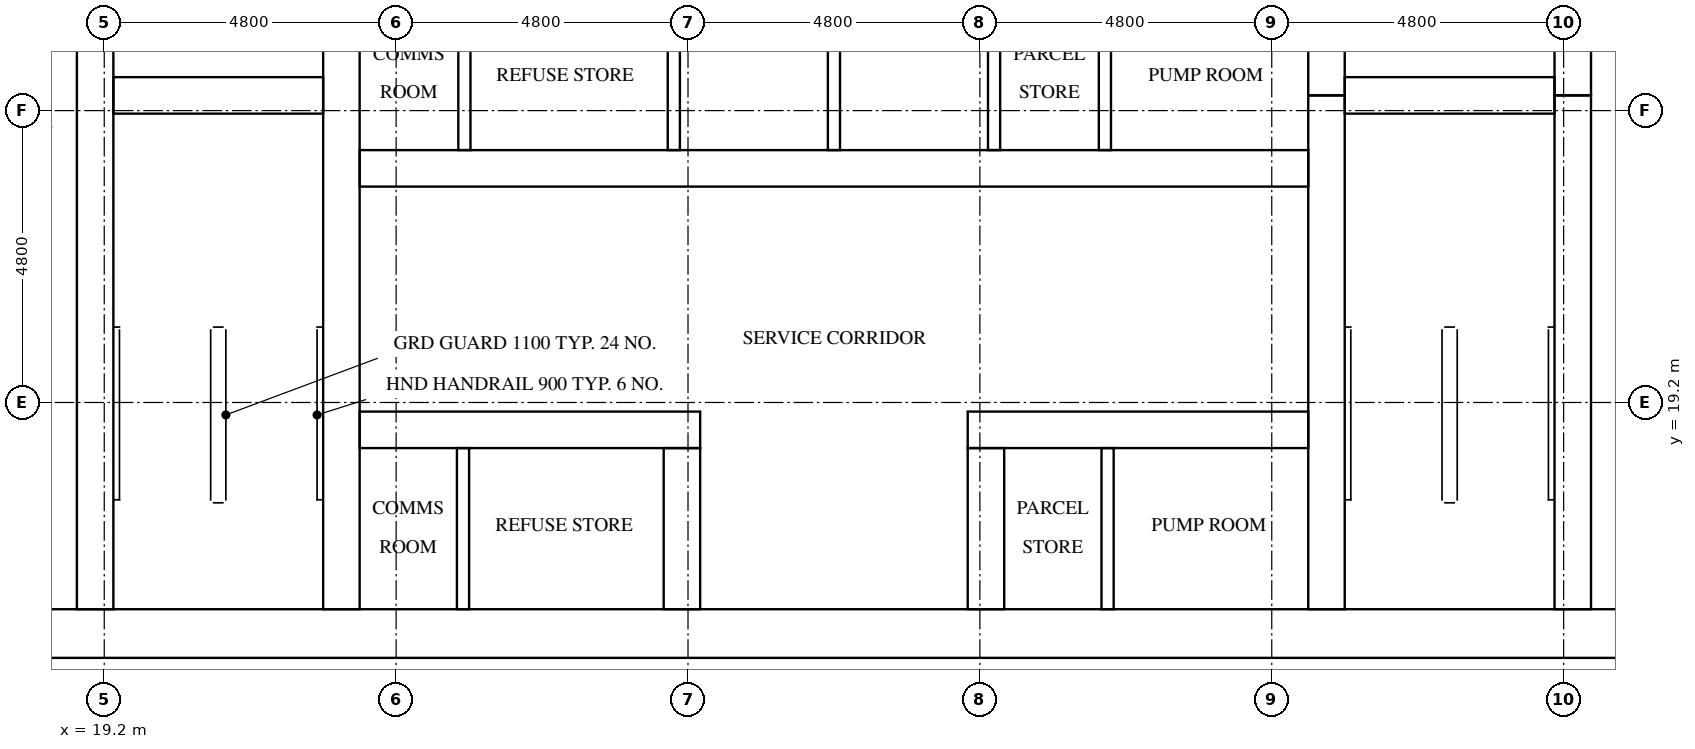
"""IFC4 building model, lengths in metres.
Left out: names, types, materials, properties, quantities, classifications, styles, units other than length and angle.
Written with IfcOpenShell. Run it as: python <this file> out.ifc"""

import sys

from ifc_helpers import new_model, si_unit, direction, frame, frame_2d, origin, place, context, subcontext, project, spatial, rectangle, extrude, element, fill, save


model = new_model("IFC4")
c1 = context("Model", 3, precision=1e-05, world=origin(), true_north=direction((0.0, 1.0)))
c2 = subcontext(c1, "Body", "Model", "MODEL_VIEW")
j1 = project(units=[si_unit("LENGTHUNIT", "METRE"), si_unit("PLANEANGLEUNIT", "RADIAN")], contexts=[c1])
p1 = place(None, origin())
s1 = spatial("IfcSite", under=j1, at=p1, CompositionType="ELEMENT")
p2 = place(p1, origin())
s2 = spatial("IfcBuilding", under=s1, at=p2, CompositionType="ELEMENT")
p3 = place(p2, frame((0.0, 0.0, 156.0)))
s3 = spatial("IfcBuildingStorey", under=s2, at=p3, CompositionType="ELEMENT", Elevation=156.0)
p4 = place(p3, frame((15.0, 15.4, 0.0), z_axis=(0.0, 0.0, 1.0), x_axis=(1.0, 0.0, 0.0)))
e1 = element("IfcWall", 1, at=p4, inside=s3, PredefinedType="SHEAR", context=c2, shape_type="SweptSolid", body=[
    extrude(rectangle(XDim=32.4, YDim=0.8, at=frame_2d((16.2, 0.0))), origin(), (0.0, 0.0, 1.0), 3.2),
])
p5 = place(p4, frame((15.3, 0.0, 0.0)))
e2 = element("IfcOpeningElement", 2, at=p5, cuts=e1, PredefinedType="OPENING", context=c2, shape_type="SweptSolid", body=[
    extrude(rectangle(XDim=1.8, YDim=2.1, at=frame_2d((0.9, 1.05))), frame((0.0, 0.41, 0.0), z_axis=(0.0, -1.0, 0.0), x_axis=(1.0, 0.0, 0.0)), (0.0, 0.0, 1.0), 0.82),
])
p6 = place(p3, frame((19.05, 15.8, 0.0), z_axis=(0.0, 0.0, 1.0), x_axis=(0.0, 1.0, 0.0)))
e3 = element("IfcWall", 3, at=p6, inside=s3, PredefinedType="SHEAR", context=c2, shape_type="SweptSolid", body=[
    extrude(rectangle(XDim=15.15, YDim=0.6, at=frame_2d((7.575, 0.0))), origin(), (0.0, 0.0, 1.0), 3.2),
])
p7 = place(p6, frame((9.65, 0.0, 0.0)))
e4 = element("IfcOpeningElement", 4, at=p7, cuts=e3, PredefinedType="OPENING", context=c2, shape_type="SweptSolid", body=[
    extrude(rectangle(XDim=1.1, YDim=2.1, at=frame_2d((0.55, 1.05))), frame((0.0, 0.31, 0.0), z_axis=(0.0, -1.0, 0.0), x_axis=(1.0, 0.0, 0.0)), (0.0, 0.0, 1.0), 0.62),
])
p8 = place(p6, frame((13.15, 0.0, 0.0)))
e5 = element("IfcOpeningElement", 5, at=p8, cuts=e3, PredefinedType="OPENING", context=c2, shape_type="SweptSolid", body=[
    extrude(rectangle(XDim=1.1, YDim=2.1, at=frame_2d((0.55, 1.05))), frame((0.0, 0.31, 0.0), z_axis=(0.0, -1.0, 0.0), x_axis=(1.0, 0.0, 0.0)), (0.0, 0.0, 1.0), 0.62),
])
p9 = place(p6, frame((0.4, 0.0, 0.0)))
e6 = element("IfcOpeningElement", 6, at=p9, cuts=e3, PredefinedType="OPENING", context=c2, shape_type="SweptSolid", body=[
    extrude(rectangle(XDim=1.2, YDim=2.1, at=frame_2d((0.6, 1.05))), frame((0.0, 0.31, 0.0), z_axis=(0.0, -1.0, 0.0), x_axis=(1.0, 0.0, 0.0)), (0.0, 0.0, 1.0), 0.62),
])
p10 = place(p3, frame((23.1, 15.8, 0.0), z_axis=(0.0, 0.0, 1.0), x_axis=(0.0, 1.0, 0.0)))
e7 = element("IfcWall", 7, at=p10, inside=s3, PredefinedType="SHEAR", context=c2, shape_type="SweptSolid", body=[
    extrude(rectangle(XDim=21.2, YDim=0.6, at=frame_2d((10.6, 0.0))), origin(), (0.0, 0.0, 1.0), 3.2),
])
p11 = place(p3, frame((39.3, 15.8, 0.0), z_axis=(0.0, 0.0, 1.0), x_axis=(0.0, 1.0, 0.0)))
e8 = element("IfcWall", 8, at=p11, inside=s3, PredefinedType="SHEAR", context=c2, shape_type="SweptSolid", body=[
    extrude(rectangle(XDim=8.45, YDim=0.6, at=frame_2d((4.225, 0.0))), origin(), (0.0, 0.0, 1.0), 3.2),
])
p12 = place(p3, frame((39.3, 24.25, 0.0), z_axis=(0.0, 0.0, 1.0), x_axis=(0.0, 1.0, 0.0)))
e9 = element("IfcWall", 9, at=p12, inside=s3, PredefinedType="SHEAR", context=c2, shape_type="SweptSolid", body=[
    extrude(rectangle(XDim=3.5, YDim=0.6, at=frame_2d((1.75, 0.0))), origin(), (0.0, 0.0, 1.0), 3.2),
])
p13 = place(p3, frame((43.35, 15.8, 0.0), z_axis=(0.0, 0.0, 1.0), x_axis=(0.0, 1.0, 0.0)))
e10 = element("IfcWall", 10, at=p13, inside=s3, PredefinedType="SHEAR", context=c2, shape_type="SweptSolid", body=[
    extrude(rectangle(XDim=8.45, YDim=0.6, at=frame_2d((4.225, 0.0))), origin(), (0.0, 0.0, 1.0), 3.2),
])
p14 = place(p13, frame((0.4, 0.0, 0.0)))
e11 = element("IfcOpeningElement", 11, at=p14, cuts=e10, PredefinedType="OPENING", context=c2, shape_type="SweptSolid", body=[
    extrude(rectangle(XDim=1.2, YDim=2.1, at=frame_2d((0.6, 1.05))), frame((0.0, 0.31, 0.0), z_axis=(0.0, -1.0, 0.0), x_axis=(1.0, 0.0, 0.0)), (0.0, 0.0, 1.0), 0.62),
])
p15 = place(p3, frame((43.35, 24.25, 0.0), z_axis=(0.0, 0.0, 1.0), x_axis=(0.0, 1.0, 0.0)))
e12 = element("IfcWall", 12, at=p15, inside=s3, PredefinedType="SHEAR", context=c2, shape_type="SweptSolid", body=[
    extrude(rectangle(XDim=3.5, YDim=0.6, at=frame_2d((1.75, 0.0))), origin(), (0.0, 0.0, 1.0), 3.2),
])
p16 = place(p15, frame((1.2, 0.0, 0.0)))
e13 = element("IfcOpeningElement", 13, at=p16, cuts=e12, PredefinedType="OPENING", context=c2, shape_type="SweptSolid", body=[
    extrude(rectangle(XDim=1.1, YDim=2.1, at=frame_2d((0.55, 1.05))), frame((0.0, 0.31, 0.0), z_axis=(0.0, -1.0, 0.0), x_axis=(1.0, 0.0, 0.0)), (0.0, 0.0, 1.0), 0.62),
])
for number, where, z_axis, x_axis in (
    (14, (19.35, 24.25, 0.0), (0.0, 0.0, 1.0), (1.0, 0.0, 0.0)),
    (15, (39.6, 24.25, 0.0), (0.0, 0.0, 1.0), (1.0, 0.0, 0.0)),
):
    element("IfcWall", number, at=place(p3, frame(where, z_axis=z_axis, x_axis=x_axis)), inside=s3, PredefinedType="SHEAR", context=c2, shape_type="SweptSolid", body=[
        extrude(rectangle(XDim=3.45, YDim=0.6, at=frame_2d((1.725, 0.0))), origin(), (0.0, 0.0, 1.0), 3.2),
    ])
p17 = place(p3, frame((23.4, 18.75, 0.0), z_axis=(0.0, 0.0, 1.0), x_axis=(1.0, 0.0, 0.0)))
e16 = element("IfcWall", 16, at=p17, inside=s3, PredefinedType="SHEAR", context=c2, shape_type="SweptSolid", body=[
    extrude(rectangle(XDim=5.6, YDim=0.6, at=frame_2d((2.8, 0.0))), origin(), (0.0, 0.0, 1.0), 3.2),
])
p18 = place(p17, frame((0.3, 0.0, 0.0)))
e17 = element("IfcOpeningElement", 17, at=p18, cuts=e16, PredefinedType="OPENING", context=c2, shape_type="SweptSolid", body=[
    extrude(rectangle(XDim=1.0, YDim=2.1, at=frame_2d((0.5, 1.05))), frame((0.0, 0.31, 0.0), z_axis=(0.0, -1.0, 0.0), x_axis=(1.0, 0.0, 0.0)), (0.0, 0.0, 1.0), 0.62),
])
p19 = place(p17, frame((2.9, 0.0, 0.0)))
e18 = element("IfcOpeningElement", 18, at=p19, cuts=e16, PredefinedType="OPENING", context=c2, shape_type="SweptSolid", body=[
    extrude(rectangle(XDim=1.0, YDim=2.1, at=frame_2d((0.5, 1.05))), frame((0.0, 0.31, 0.0), z_axis=(0.0, -1.0, 0.0), x_axis=(1.0, 0.0, 0.0)), (0.0, 0.0, 1.0), 0.62),
])
p20 = place(p3, frame((33.4, 18.75, 0.0), z_axis=(0.0, 0.0, 1.0), x_axis=(1.0, 0.0, 0.0)))
e19 = element("IfcWall", 19, at=p20, inside=s3, PredefinedType="SHEAR", context=c2, shape_type="SweptSolid", body=[
    extrude(rectangle(XDim=5.6, YDim=0.6, at=frame_2d((2.8, 0.0))), origin(), (0.0, 0.0, 1.0), 3.2),
])
p21 = place(p20, frame((0.9, 0.0, 0.0)))
e20 = element("IfcOpeningElement", 20, at=p21, cuts=e19, PredefinedType="OPENING", context=c2, shape_type="SweptSolid", body=[
    extrude(rectangle(XDim=1.0, YDim=2.1, at=frame_2d((0.5, 1.05))), frame((0.0, 0.31, 0.0), z_axis=(0.0, -1.0, 0.0), x_axis=(1.0, 0.0, 0.0)), (0.0, 0.0, 1.0), 0.62),
])
p22 = place(p20, frame((3.5, 0.0, 0.0)))
e21 = element("IfcOpeningElement", 21, at=p22, cuts=e19, PredefinedType="OPENING", context=c2, shape_type="SweptSolid", body=[
    extrude(rectangle(XDim=1.0, YDim=2.1, at=frame_2d((0.5, 1.05))), frame((0.0, 0.31, 0.0), z_axis=(0.0, -1.0, 0.0), x_axis=(1.0, 0.0, 0.0)), (0.0, 0.0, 1.0), 0.62),
])
p23 = place(p3, frame((23.4, 23.05, 0.0), z_axis=(0.0, 0.0, 1.0), x_axis=(1.0, 0.0, 0.0)))
e22 = element("IfcWall", 22, at=p23, inside=s3, PredefinedType="SHEAR", context=c2, shape_type="SweptSolid", body=[
    extrude(rectangle(XDim=15.6, YDim=0.6, at=frame_2d((7.8, 0.0))), origin(), (0.0, 0.0, 1.0), 3.2),
])
p24 = place(p23, frame((0.311, 0.0, 0.0)))
e23 = element("IfcOpeningElement", 23, at=p24, cuts=e22, PredefinedType="OPENING", context=c2, shape_type="SweptSolid", body=[
    extrude(rectangle(XDim=1.0, YDim=2.1, at=frame_2d((0.5, 1.05))), frame((0.0, 0.31, 0.0), z_axis=(0.0, -1.0, 0.0), x_axis=(1.0, 0.0, 0.0)), (0.0, 0.0, 1.0), 0.62),
])
p25 = place(p23, frame((2.945, 0.0, 0.0)))
e24 = element("IfcOpeningElement", 24, at=p25, cuts=e22, PredefinedType="OPENING", context=c2, shape_type="SweptSolid", body=[
    extrude(rectangle(XDim=1.0, YDim=2.1, at=frame_2d((0.5, 1.05))), frame((0.0, 0.31, 0.0), z_axis=(0.0, -1.0, 0.0), x_axis=(1.0, 0.0, 0.0)), (0.0, 0.0, 1.0), 0.62),
])
p26 = place(p23, frame((10.845, 0.0, 0.0)))
e25 = element("IfcOpeningElement", 25, at=p26, cuts=e22, PredefinedType="OPENING", context=c2, shape_type="SweptSolid", body=[
    extrude(rectangle(XDim=1.0, YDim=2.1, at=frame_2d((0.5, 1.05))), frame((0.0, 0.31, 0.0), z_axis=(0.0, -1.0, 0.0), x_axis=(1.0, 0.0, 0.0)), (0.0, 0.0, 1.0), 0.62),
])
p27 = place(p23, frame((13.478, 0.0, 0.0)))
e26 = element("IfcOpeningElement", 26, at=p27, cuts=e22, PredefinedType="OPENING", context=c2, shape_type="SweptSolid", body=[
    extrude(rectangle(XDim=1.0, YDim=2.1, at=frame_2d((0.5, 1.05))), frame((0.0, 0.31, 0.0), z_axis=(0.0, -1.0, 0.0), x_axis=(1.0, 0.0, 0.0)), (0.0, 0.0, 1.0), 0.62),
])
for number, where, z_axis, x_axis in (
    (27, (28.7, 15.8, 0.0), (0.0, 0.0, 1.0), (0.0, 1.0, 0.0)),
    (28, (33.7, 15.8, 0.0), (0.0, 0.0, 1.0), (0.0, 1.0, 0.0)),
):
    element("IfcWall", number, at=place(p3, frame(where, z_axis=z_axis, x_axis=x_axis)), inside=s3, PredefinedType="SHEAR", context=c2, shape_type="SweptSolid", body=[
        extrude(rectangle(XDim=2.65, YDim=0.6, at=frame_2d((1.325, 0.0))), origin(), (0.0, 0.0, 1.0), 3.2),
    ])
for number, where, z_axis, x_axis in (
    (29, (28.567, 23.35, 0.0), (0.0, 0.0, 1.0), (0.0, 1.0, 0.0)),
    (30, (31.2, 23.35, 0.0), (0.0, 0.0, 1.0), (0.0, 1.0, 0.0)),
    (31, (33.833, 23.35, 0.0), (0.0, 0.0, 1.0), (0.0, 1.0, 0.0)),
):
    element("IfcWall", number, at=place(p3, frame(where, z_axis=z_axis, x_axis=x_axis)), inside=s3, PredefinedType="SOLIDWALL", context=c2, shape_type="SweptSolid", body=[
        extrude(rectangle(XDim=2.5, YDim=0.2, at=frame_2d((1.25, 0.0))), origin(), (0.0, 0.0, 1.0), 3.2),
    ])
for number, where, z_axis, x_axis in (
    (32, (25.123, 23.35, 0.0), (0.0, 0.0, 1.0), (0.0, 1.0, 0.0)),
    (33, (35.656, 23.35, 0.0), (0.0, 0.0, 1.0), (0.0, 1.0, 0.0)),
):
    element("IfcWall", number, at=place(p3, frame(where, z_axis=z_axis, x_axis=x_axis)), inside=s3, PredefinedType="PARTITIONING", context=c2, shape_type="SweptSolid", body=[
        extrude(rectangle(XDim=2.5, YDim=0.2, at=frame_2d((1.25, 0.0))), origin(), (0.0, 0.0, 1.0), 3.2),
    ])
for number, where, z_axis, x_axis in (
    (34, (25.1, 15.8, 0.0), (0.0, 0.0, 1.0), (0.0, 1.0, 0.0)),
    (35, (35.7, 15.8, 0.0), (0.0, 0.0, 1.0), (0.0, 1.0, 0.0)),
):
    element("IfcWall", number, at=place(p3, frame(where, z_axis=z_axis, x_axis=x_axis)), inside=s3, PredefinedType="PARTITIONING", context=c2, shape_type="SweptSolid", body=[
        extrude(rectangle(XDim=2.65, YDim=0.2, at=frame_2d((1.325, 0.0))), origin(), (0.0, 0.0, 1.0), 3.2),
    ])
p28 = place(p9, frame((1.2, 0.0, 0.0), z_axis=(0.0, 0.0, 1.0), x_axis=(-1.0, 0.0, 0.0)))
e36 = element("IfcDoor", 36, at=p28, inside=s3, OperationType="SINGLE_SWING_RIGHT", PredefinedType="DOOR", context=c2, shape_type="SweptSolid", body=[
    extrude(rectangle(XDim=1.2, YDim=2.1, at=frame_2d((0.6, 1.05))), frame((0.0, 0.025, 0.0), z_axis=(0.0, -1.0, 0.0), x_axis=(1.0, 0.0, 0.0)), (0.0, 0.0, 1.0), 0.05),
])
fill(e6, e36)
p29 = place(p14, origin())
e37 = element("IfcDoor", 37, at=p29, inside=s3, OperationType="SINGLE_SWING_LEFT", PredefinedType="DOOR", context=c2, shape_type="SweptSolid", body=[
    extrude(rectangle(XDim=1.2, YDim=2.1, at=frame_2d((0.6, 1.05))), frame((0.0, 0.025, 0.0), z_axis=(0.0, -1.0, 0.0), x_axis=(1.0, 0.0, 0.0)), (0.0, 0.0, 1.0), 0.05),
])
fill(e11, e37)
p30 = place(p5, frame((1.8, 0.0, 0.0), z_axis=(0.0, 0.0, 1.0), x_axis=(-1.0, 0.0, 0.0)))
e38 = element("IfcDoor", 38, at=p30, inside=s3, OperationType="DOUBLE_DOOR_SINGLE_SWING", PredefinedType="DOOR", context=c2, shape_type="SweptSolid", body=[
    extrude(rectangle(XDim=1.8, YDim=2.1, at=frame_2d((0.9, 1.05))), frame((0.0, 0.025, 0.0), z_axis=(0.0, -1.0, 0.0), x_axis=(1.0, 0.0, 0.0)), (0.0, 0.0, 1.0), 0.05),
])
fill(e2, e38)
p31 = place(p24, frame((1.0, 0.0, 0.0), z_axis=(0.0, 0.0, 1.0), x_axis=(-1.0, 0.0, 0.0)))
e39 = element("IfcDoor", 39, at=p31, inside=s3, OperationType="SINGLE_SWING_LEFT", PredefinedType="DOOR", context=c2, shape_type="SweptSolid", body=[
    extrude(rectangle(XDim=1.0, YDim=2.1, at=frame_2d((0.5, 1.05))), frame((0.0, 0.025, 0.0), z_axis=(0.0, -1.0, 0.0), x_axis=(1.0, 0.0, 0.0)), (0.0, 0.0, 1.0), 0.05),
])
fill(e23, e39)
p32 = place(p25, frame((1.0, 0.0, 0.0), z_axis=(0.0, 0.0, 1.0), x_axis=(-1.0, 0.0, 0.0)))
e40 = element("IfcDoor", 40, at=p32, inside=s3, OperationType="SINGLE_SWING_RIGHT", PredefinedType="DOOR", context=c2, shape_type="SweptSolid", body=[
    extrude(rectangle(XDim=1.0, YDim=2.1, at=frame_2d((0.5, 1.05))), frame((0.0, 0.025, 0.0), z_axis=(0.0, -1.0, 0.0), x_axis=(1.0, 0.0, 0.0)), (0.0, 0.0, 1.0), 0.05),
])
fill(e24, e40)
p33 = place(p26, frame((1.0, 0.0, 0.0), z_axis=(0.0, 0.0, 1.0), x_axis=(-1.0, 0.0, 0.0)))
e41 = element("IfcDoor", 41, at=p33, inside=s3, OperationType="SINGLE_SWING_LEFT", PredefinedType="DOOR", context=c2, shape_type="SweptSolid", body=[
    extrude(rectangle(XDim=1.0, YDim=2.1, at=frame_2d((0.5, 1.05))), frame((0.0, 0.025, 0.0), z_axis=(0.0, -1.0, 0.0), x_axis=(1.0, 0.0, 0.0)), (0.0, 0.0, 1.0), 0.05),
])
fill(e25, e41)
p34 = place(p27, frame((1.0, 0.0, 0.0), z_axis=(0.0, 0.0, 1.0), x_axis=(-1.0, 0.0, 0.0)))
e42 = element("IfcDoor", 42, at=p34, inside=s3, OperationType="SINGLE_SWING_RIGHT", PredefinedType="DOOR", context=c2, shape_type="SweptSolid", body=[
    extrude(rectangle(XDim=1.0, YDim=2.1, at=frame_2d((0.5, 1.05))), frame((0.0, 0.025, 0.0), z_axis=(0.0, -1.0, 0.0), x_axis=(1.0, 0.0, 0.0)), (0.0, 0.0, 1.0), 0.05),
])
fill(e26, e42)
p35 = place(p18, origin())
e43 = element("IfcDoor", 43, at=p35, inside=s3, OperationType="SINGLE_SWING_LEFT", PredefinedType="DOOR", context=c2, shape_type="SweptSolid", body=[
    extrude(rectangle(XDim=1.0, YDim=2.1, at=frame_2d((0.5, 1.05))), frame((0.0, 0.025, 0.0), z_axis=(0.0, -1.0, 0.0), x_axis=(1.0, 0.0, 0.0)), (0.0, 0.0, 1.0), 0.05),
])
fill(e17, e43)
p36 = place(p19, origin())
e44 = element("IfcDoor", 44, at=p36, inside=s3, OperationType="SINGLE_SWING_RIGHT", PredefinedType="DOOR", context=c2, shape_type="SweptSolid", body=[
    extrude(rectangle(XDim=1.0, YDim=2.1, at=frame_2d((0.5, 1.05))), frame((0.0, 0.025, 0.0), z_axis=(0.0, -1.0, 0.0), x_axis=(1.0, 0.0, 0.0)), (0.0, 0.0, 1.0), 0.05),
])
fill(e18, e44)
p37 = place(p21, origin())
e45 = element("IfcDoor", 45, at=p37, inside=s3, OperationType="SINGLE_SWING_LEFT", PredefinedType="DOOR", context=c2, shape_type="SweptSolid", body=[
    extrude(rectangle(XDim=1.0, YDim=2.1, at=frame_2d((0.5, 1.05))), frame((0.0, 0.025, 0.0), z_axis=(0.0, -1.0, 0.0), x_axis=(1.0, 0.0, 0.0)), (0.0, 0.0, 1.0), 0.05),
])
fill(e20, e45)
p38 = place(p22, origin())
e46 = element("IfcDoor", 46, at=p38, inside=s3, OperationType="SINGLE_SWING_RIGHT", PredefinedType="DOOR", context=c2, shape_type="SweptSolid", body=[
    extrude(rectangle(XDim=1.0, YDim=2.1, at=frame_2d((0.5, 1.05))), frame((0.0, 0.025, 0.0), z_axis=(0.0, -1.0, 0.0), x_axis=(1.0, 0.0, 0.0)), (0.0, 0.0, 1.0), 0.05),
])
fill(e21, e46)
save(model, sys.argv[1])
